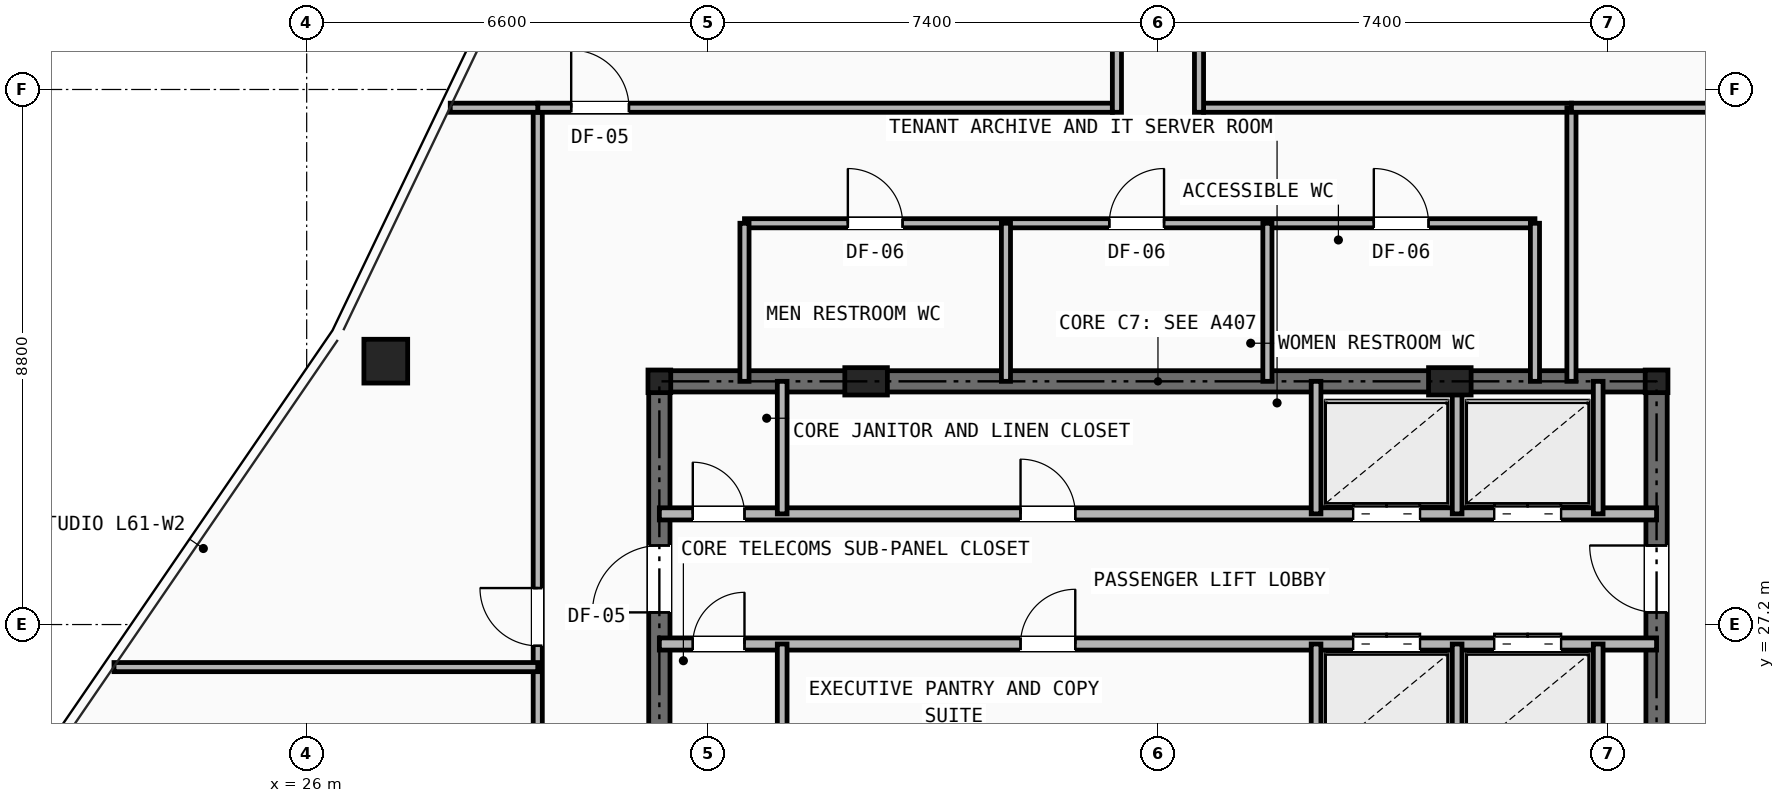
"""IFC4 building model, lengths in metres.
Left out: names, types, materials, properties, quantities, classifications, styles, units other than length and angle.
Written with IfcOpenShell. Run it as: python <this file> out.ifc"""

import sys

from ifc_helpers import new_model, si_unit, direction, frame, frame_2d, origin, origin_2d, place, context, subcontext, project, spatial, rectangle, hollow_rectangle, i_section, extrude, element, fill, save


model = new_model("IFC4")
c1 = context("Model", 3, precision=1e-05, world=origin(), true_north=direction((0.0, 1.0)))
c2 = subcontext(c1, "Body", "Model", "MODEL_VIEW")
j1 = project(units=[si_unit("LENGTHUNIT", "METRE"), si_unit("PLANEANGLEUNIT", "RADIAN")], contexts=[c1])
p1 = place(None, origin())
s1 = spatial("IfcSite", under=j1, at=p1, CompositionType="ELEMENT")
p2 = place(p1, origin())
s2 = spatial("IfcBuilding", under=s1, at=p2, CompositionType="ELEMENT")
p3 = place(p2, frame((0.0, 0.0, 215.4)))
s3 = spatial("IfcBuildingStorey", under=s2, at=p3, CompositionType="ELEMENT", Elevation=215.4)
for number, where, z_axis, x_axis in (
    (1, (31.8, 31.2, 0.0), (0.0, 0.0, 1.0), (1.0, 0.0, 0.0)),
    (2, (48.2, 31.2, 0.0), (0.0, 0.0, 1.0), (1.0, 0.0, 0.0)),
):
    element("IfcColumn", number, at=place(p3, frame(where, z_axis=z_axis, x_axis=x_axis)), inside=s3, PredefinedType="COLUMN", context=c2, shape_type="SweptSolid", body=[
        extrude(i_section(OverallWidth=0.374, OverallDepth=0.372, WebThickness=0.016, FlangeThickness=0.026, at=origin_2d()), origin(), (0.0, 0.0, 1.0), 3.5),
    ])
for number, where, z_axis, x_axis in (
    (3, (35.2, 31.2, 0.0), (0.0, 0.0, 1.0), (1.0, 0.0, 0.0)),
    (4, (44.8, 31.2, 0.0), (0.0, 0.0, 1.0), (1.0, 0.0, 0.0)),
):
    element("IfcColumn", number, at=place(p3, frame(where, z_axis=z_axis, x_axis=x_axis)), inside=s3, PredefinedType="PILASTER", context=c2, shape_type="SweptSolid", body=[
        extrude(rectangle(XDim=0.7, YDim=0.45, at=origin_2d()), origin(), (0.0, 0.0, 1.0), 3.5),
    ])
p4 = place(p3, frame((27.301, 31.532, 0.0), z_axis=(0.0, 0.0, 1.0), x_axis=(1.0, 0.0, 0.0)))
e5 = element("IfcColumn", 5, at=p4, inside=s3, PredefinedType="COLUMN", context=c2, shape_type="SweptSolid", body=[
    extrude(hollow_rectangle(XDim=0.72, YDim=0.72, WallThickness=0.05, at=origin_2d()), origin(), (0.0, 0.0, 1.0), 3.5),
])
p5 = place(p3, frame((31.8, 31.2, 0.0), z_axis=(0.0, 0.0, 1.0), x_axis=(1.0, 0.0, 0.0)))
e6 = element("IfcWall", 6, at=p5, inside=s3, PredefinedType="SHEAR", context=c2, shape_type="SweptSolid", body=[
    extrude(rectangle(XDim=16.4, YDim=0.35, at=frame_2d((8.2, 0.0))), origin(), (0.0, 0.0, 1.0), 3.25),
])
p6 = place(p3, frame((31.8, 16.4, 0.0), z_axis=(0.0, 0.0, 1.0), x_axis=(0.0, 1.0, 0.0)))
e7 = element("IfcWall", 7, at=p6, inside=s3, PredefinedType="SHEAR", context=c2, shape_type="SweptSolid", body=[
    extrude(rectangle(XDim=14.8, YDim=0.35, at=frame_2d((7.4, 0.0))), origin(), (0.0, 0.0, 1.0), 3.25),
])
p7 = place(p6, frame((11.0, 0.0, 0.0)))
e8 = element("IfcOpeningElement", 8, at=p7, cuts=e7, PredefinedType="OPENING", context=c2, shape_type="SweptSolid", body=[
    extrude(rectangle(XDim=1.1, YDim=2.15, at=frame_2d((0.55, 1.075))), frame((0.0, 0.185, 0.0), z_axis=(0.0, -1.0, 0.0), x_axis=(1.0, 0.0, 0.0)), (0.0, 0.0, 1.0), 0.37),
])
p8 = place(p3, frame((48.2, 16.4, 0.0), z_axis=(0.0, 0.0, 1.0), x_axis=(0.0, 1.0, 0.0)))
e9 = element("IfcWall", 9, at=p8, inside=s3, PredefinedType="SHEAR", context=c2, shape_type="SweptSolid", body=[
    extrude(rectangle(XDim=14.8, YDim=0.35, at=frame_2d((7.4, 0.0))), origin(), (0.0, 0.0, 1.0), 3.25),
])
p9 = place(p8, frame((11.0, 0.0, 0.0)))
e10 = element("IfcOpeningElement", 10, at=p9, cuts=e9, PredefinedType="OPENING", context=c2, shape_type="SweptSolid", body=[
    extrude(rectangle(XDim=1.1, YDim=2.15, at=frame_2d((0.55, 1.075))), frame((0.0, 0.185, 0.0), z_axis=(0.0, -1.0, 0.0), x_axis=(1.0, 0.0, 0.0)), (0.0, 0.0, 1.0), 0.37),
])
p10 = place(p3, frame((31.8, 29.02, 0.0), z_axis=(0.0, 0.0, 1.0), x_axis=(1.0, 0.0, 0.0)))
e11 = element("IfcWall", 11, at=p10, inside=s3, PredefinedType="SOLIDWALL", context=c2, shape_type="SweptSolid", body=[
    extrude(rectangle(XDim=16.4, YDim=0.2, at=frame_2d((8.2, 0.0))), origin(), (0.0, 0.0, 1.0), 2.705),
])
p11 = place(p10, frame((0.55, 0.0, 0.0)))
e12 = element("IfcOpeningElement", 12, at=p11, cuts=e11, PredefinedType="OPENING", context=c2, shape_type="SweptSolid", body=[
    extrude(rectangle(XDim=0.85, YDim=2.05, at=frame_2d((0.425, 1.025))), frame((0.0, 0.11, 0.0), z_axis=(0.0, -1.0, 0.0), x_axis=(1.0, 0.0, 0.0)), (0.0, 0.0, 1.0), 0.22),
])
p12 = place(p10, frame((5.94, 0.0, 0.0)))
e13 = element("IfcOpeningElement", 13, at=p12, cuts=e11, PredefinedType="OPENING", context=c2, shape_type="SweptSolid", body=[
    extrude(rectangle(XDim=0.9, YDim=2.1, at=frame_2d((0.45, 1.05))), frame((0.0, 0.11, 0.0), z_axis=(0.0, -1.0, 0.0), x_axis=(1.0, 0.0, 0.0)), (0.0, 0.0, 1.0), 0.22),
])
p13 = place(p10, frame((11.41, 0.0, 0.0)))
e14 = element("IfcOpeningElement", 14, at=p13, cuts=e11, PredefinedType="OPENING", context=c2, shape_type="SweptSolid", body=[
    extrude(rectangle(XDim=1.1, YDim=2.15, at=frame_2d((0.55, 1.075))), frame((0.0, 0.11, 0.0), z_axis=(0.0, -1.0, 0.0), x_axis=(1.0, 0.0, 0.0)), (0.0, 0.0, 1.0), 0.22),
])
p14 = place(p10, frame((13.73, 0.0, 0.0)))
e15 = element("IfcOpeningElement", 15, at=p14, cuts=e11, PredefinedType="OPENING", context=c2, shape_type="SweptSolid", body=[
    extrude(rectangle(XDim=1.1, YDim=2.15, at=frame_2d((0.55, 1.075))), frame((0.0, 0.11, 0.0), z_axis=(0.0, -1.0, 0.0), x_axis=(1.0, 0.0, 0.0)), (0.0, 0.0, 1.0), 0.22),
])
p15 = place(p3, frame((31.8, 26.88, 0.0), z_axis=(0.0, 0.0, 1.0), x_axis=(1.0, 0.0, 0.0)))
e16 = element("IfcWall", 16, at=p15, inside=s3, PredefinedType="SOLIDWALL", context=c2, shape_type="SweptSolid", body=[
    extrude(rectangle(XDim=16.4, YDim=0.2, at=frame_2d((8.2, 0.0))), origin(), (0.0, 0.0, 1.0), 2.705),
])
p16 = place(p15, frame((0.55, 0.0, 0.0)))
e17 = element("IfcOpeningElement", 17, at=p16, cuts=e16, PredefinedType="OPENING", context=c2, shape_type="SweptSolid", body=[
    extrude(rectangle(XDim=0.85, YDim=2.05, at=frame_2d((0.425, 1.025))), frame((0.0, 0.11, 0.0), z_axis=(0.0, -1.0, 0.0), x_axis=(1.0, 0.0, 0.0)), (0.0, 0.0, 1.0), 0.22),
])
p17 = place(p15, frame((5.94, 0.0, 0.0)))
e18 = element("IfcOpeningElement", 18, at=p17, cuts=e16, PredefinedType="OPENING", context=c2, shape_type="SweptSolid", body=[
    extrude(rectangle(XDim=0.9, YDim=2.1, at=frame_2d((0.45, 1.05))), frame((0.0, 0.11, 0.0), z_axis=(0.0, -1.0, 0.0), x_axis=(1.0, 0.0, 0.0)), (0.0, 0.0, 1.0), 0.22),
])
p18 = place(p15, frame((11.41, 0.0, 0.0)))
e19 = element("IfcOpeningElement", 19, at=p18, cuts=e16, PredefinedType="OPENING", context=c2, shape_type="SweptSolid", body=[
    extrude(rectangle(XDim=1.1, YDim=2.15, at=frame_2d((0.55, 1.075))), frame((0.0, 0.11, 0.0), z_axis=(0.0, -1.0, 0.0), x_axis=(1.0, 0.0, 0.0)), (0.0, 0.0, 1.0), 0.22),
])
p19 = place(p15, frame((13.73, 0.0, 0.0)))
e20 = element("IfcOpeningElement", 20, at=p19, cuts=e16, PredefinedType="OPENING", context=c2, shape_type="SweptSolid", body=[
    extrude(rectangle(XDim=1.1, YDim=2.15, at=frame_2d((0.55, 1.075))), frame((0.0, 0.11, 0.0), z_axis=(0.0, -1.0, 0.0), x_axis=(1.0, 0.0, 0.0)), (0.0, 0.0, 1.0), 0.22),
])
p20 = place(p3, frame((33.82, 29.02, 0.0), z_axis=(0.0, 0.0, 1.0), x_axis=(0.0, 1.0, 0.0)))
e21 = element("IfcWall", 21, at=p20, inside=s3, PredefinedType="SOLIDWALL", context=c2, shape_type="SweptSolid", body=[
    extrude(rectangle(XDim=2.18, YDim=0.16, at=frame_2d((1.09, 0.0))), origin(), (0.0, 0.0, 1.0), 2.705),
])
p21 = place(p3, frame((33.82, 24.8, 0.0), z_axis=(0.0, 0.0, 1.0), x_axis=(0.0, 1.0, 0.0)))
e22 = element("IfcWall", 22, at=p21, inside=s3, PredefinedType="SOLIDWALL", context=c2, shape_type="SweptSolid", body=[
    extrude(rectangle(XDim=2.08, YDim=0.16, at=frame_2d((1.04, 0.0))), origin(), (0.0, 0.0, 1.0), 3.25),
])
for number, where, z_axis, x_axis in (
    (23, (42.6, 29.02, 0.0), (0.0, 0.0, 1.0), (0.0, 1.0, 0.0)),
    (24, (44.92, 29.02, 0.0), (0.0, 0.0, 1.0), (0.0, 1.0, 0.0)),
    (25, (47.24, 29.02, 0.0), (0.0, 0.0, 1.0), (0.0, 1.0, 0.0)),
):
    element("IfcWall", number, at=place(p3, frame(where, z_axis=z_axis, x_axis=x_axis)), inside=s3, PredefinedType="SOLIDWALL", context=c2, shape_type="SweptSolid", body=[
        extrude(rectangle(XDim=2.18, YDim=0.16, at=frame_2d((1.09, 0.0))), origin(), (0.0, 0.0, 1.0), 2.705),
    ])
for number, where, z_axis, x_axis in (
    (26, (42.6, 24.8, 0.0), (0.0, 0.0, 1.0), (0.0, 1.0, 0.0)),
    (27, (44.92, 24.8, 0.0), (0.0, 0.0, 1.0), (0.0, 1.0, 0.0)),
    (28, (47.24, 24.8, 0.0), (0.0, 0.0, 1.0), (0.0, 1.0, 0.0)),
):
    element("IfcWall", number, at=place(p3, frame(where, z_axis=z_axis, x_axis=x_axis)), inside=s3, PredefinedType="SOLIDWALL", context=c2, shape_type="SweptSolid", body=[
        extrude(rectangle(XDim=2.08, YDim=0.16, at=frame_2d((1.04, 0.0))), origin(), (0.0, 0.0, 1.0), 3.25),
    ])
p22 = place(p3, frame((33.2, 33.8, 0.0), z_axis=(0.0, 0.0, 1.0), x_axis=(1.0, 0.0, 0.0)))
e29 = element("IfcWall", 29, at=p22, inside=s3, PredefinedType="PARTITIONING", context=c2, shape_type="SweptSolid", body=[
    extrude(rectangle(XDim=13.0, YDim=0.15, at=frame_2d((6.5, 0.0))), origin(), (0.0, 0.0, 1.0), 3.25),
])
p23 = place(p22, frame((1.7, 0.0, 0.0)))
e30 = element("IfcOpeningElement", 30, at=p23, cuts=e29, PredefinedType="OPENING", context=c2, shape_type="SweptSolid", body=[
    extrude(rectangle(XDim=0.9, YDim=2.1, at=frame_2d((0.45, 1.05))), frame((0.0, 0.085, 0.0), z_axis=(0.0, -1.0, 0.0), x_axis=(1.0, 0.0, 0.0)), (0.0, 0.0, 1.0), 0.17),
])
p24 = place(p22, frame((6.0, 0.0, 0.0)))
e31 = element("IfcOpeningElement", 31, at=p24, cuts=e29, PredefinedType="OPENING", context=c2, shape_type="SweptSolid", body=[
    extrude(rectangle(XDim=0.9, YDim=2.1, at=frame_2d((0.45, 1.05))), frame((0.0, 0.085, 0.0), z_axis=(0.0, -1.0, 0.0), x_axis=(1.0, 0.0, 0.0)), (0.0, 0.0, 1.0), 0.17),
])
p25 = place(p22, frame((10.35, 0.0, 0.0)))
e32 = element("IfcOpeningElement", 32, at=p25, cuts=e29, PredefinedType="OPENING", context=c2, shape_type="SweptSolid", body=[
    extrude(rectangle(XDim=0.9, YDim=2.1, at=frame_2d((0.45, 1.05))), frame((0.0, 0.085, 0.0), z_axis=(0.0, -1.0, 0.0), x_axis=(1.0, 0.0, 0.0)), (0.0, 0.0, 1.0), 0.17),
])
for number, where, z_axis, x_axis in (
    (33, (33.2, 31.2, 0.0), (0.0, 0.0, 1.0), (0.0, 1.0, 0.0)),
    (34, (46.2, 31.2, 0.0), (0.0, 0.0, 1.0), (0.0, 1.0, 0.0)),
    (35, (37.5, 31.2, 0.0), (0.0, 0.0, 1.0), (0.0, 1.0, 0.0)),
    (36, (41.8, 31.2, 0.0), (0.0, 0.0, 1.0), (0.0, 1.0, 0.0)),
):
    element("IfcWall", number, at=place(p3, frame(where, z_axis=z_axis, x_axis=x_axis)), inside=s3, PredefinedType="PARTITIONING", context=c2, shape_type="SweptSolid", body=[
        extrude(rectangle(XDim=2.6, YDim=0.15, at=frame_2d((1.3, 0.0))), origin(), (0.0, 0.0, 1.0), 2.705),
    ])
p26 = place(p3, frame((29.8, 16.4, 0.0), z_axis=(0.0, 0.0, 1.0), x_axis=(0.0, 1.0, 0.0)))
e37 = element("IfcWall", 37, at=p26, inside=s3, PredefinedType="PARTITIONING", context=c2, shape_type="SweptSolid", body=[
    extrude(rectangle(XDim=19.3, YDim=0.15, at=frame_2d((9.65, 0.0))), origin(), (0.0, 0.0, 1.0), 2.292),
])
p27 = place(p26, frame((0.35, 0.0, 0.0)))
e38 = element("IfcOpeningElement", 38, at=p27, cuts=e37, PredefinedType="OPENING", context=c2, shape_type="SweptSolid", body=[
    extrude(rectangle(XDim=0.95, YDim=2.1, at=frame_2d((0.475, 1.05))), frame((0.0, 0.085, 0.0), z_axis=(0.0, -1.0, 0.0), x_axis=(1.0, 0.0, 0.0)), (0.0, 0.0, 1.0), 0.17),
])
p28 = place(p26, frame((10.45, 0.0, 0.0)))
e39 = element("IfcOpeningElement", 39, at=p28, cuts=e37, PredefinedType="OPENING", context=c2, shape_type="SweptSolid", body=[
    extrude(rectangle(XDim=0.95, YDim=2.1, at=frame_2d((0.475, 1.05))), frame((0.0, 0.085, 0.0), z_axis=(0.0, -1.0, 0.0), x_axis=(1.0, 0.0, 0.0)), (0.0, 0.0, 1.0), 0.17),
])
p29 = place(p3, frame((29.8, 35.7, 0.0), z_axis=(0.0, 0.0, 1.0), x_axis=(1.0, 0.0, 0.0)))
e40 = element("IfcWall", 40, at=p29, inside=s3, PredefinedType="PARTITIONING", context=c2, shape_type="SweptSolid", body=[
    extrude(rectangle(XDim=9.45, YDim=0.15, at=frame_2d((4.725, 0.0))), origin(), (0.0, 0.0, 1.0), 2.833),
])
p30 = place(p29, frame((0.55, 0.0, 0.0)))
e41 = element("IfcOpeningElement", 41, at=p30, cuts=e40, PredefinedType="OPENING", context=c2, shape_type="SweptSolid", body=[
    extrude(rectangle(XDim=0.95, YDim=2.1, at=frame_2d((0.475, 1.05))), frame((0.0, 0.085, 0.0), z_axis=(0.0, -1.0, 0.0), x_axis=(1.0, 0.0, 0.0)), (0.0, 0.0, 1.0), 0.17),
])
p31 = place(p3, frame((40.75, 35.7, 0.0), z_axis=(0.0, 0.0, 1.0), x_axis=(1.0, 0.0, 0.0)))
e42 = element("IfcWall", 42, at=p31, inside=s3, PredefinedType="PARTITIONING", context=c2, shape_type="SweptSolid", body=[
    extrude(rectangle(XDim=6.05, YDim=0.15, at=frame_2d((3.025, 0.0))), origin(), (0.0, 0.0, 1.0), 3.25),
])
p32 = place(p3, frame((46.8, 31.2, 0.0), z_axis=(0.0, 0.0, 1.0), x_axis=(0.0, 1.0, 0.0)))
e43 = element("IfcWall", 43, at=p32, inside=s3, PredefinedType="PARTITIONING", context=c2, shape_type="SweptSolid", body=[
    extrude(rectangle(XDim=4.5, YDim=0.15, at=frame_2d((2.25, 0.0))), origin(), (0.0, 0.0, 1.0), 2.705),
])
p33 = place(p3, frame((28.361, 35.7, 0.0), z_axis=(0.0, 0.0, 1.0), x_axis=(1.0, 0.0, 0.0)))
e44 = element("IfcWall", 44, at=p33, inside=s3, PredefinedType="PARTITIONING", context=c2, shape_type="SweptSolid", body=[
    extrude(rectangle(XDim=1.439, YDim=0.15, at=frame_2d((0.719, 0.0))), origin(), (0.0, 0.0, 1.0), 2.628),
])
p34 = place(p3, frame((22.831, 26.5, 0.0), z_axis=(0.0, 0.0, 1.0), x_axis=(1.0, 0.0, 0.0)))
e45 = element("IfcWall", 45, at=p34, inside=s3, PredefinedType="PARTITIONING", context=c2, shape_type="SweptSolid", body=[
    extrude(rectangle(XDim=6.969, YDim=0.15, at=frame_2d((3.484, 0.0))), origin(), (0.0, 0.0, 1.0), 2.628),
])
p35 = place(p3, frame((46.8, 35.7, 0.0), z_axis=(0.0, 0.0, 1.0), x_axis=(1.0, 0.0, 0.0)))
e46 = element("IfcWall", 46, at=p35, inside=s3, PredefinedType="PARTITIONING", context=c2, shape_type="SweptSolid", body=[
    extrude(rectangle(XDim=4.839, YDim=0.15, at=frame_2d((2.419, 0.0))), origin(), (0.0, 0.0, 1.0), 2.628),
])
for number, where, z_axis, x_axis in (
    (47, (39.325, 35.625, 0.0), (0.0, 0.0, 1.0), (0.0, 1.0, 0.0)),
    (48, (40.675, 35.625, 0.0), (0.0, 0.0, 1.0), (0.0, 1.0, 0.0)),
):
    element("IfcWall", number, at=place(p3, frame(where, z_axis=z_axis, x_axis=x_axis)), inside=s3, PredefinedType="PARTITIONING", context=c2, shape_type="SweptSolid", body=[
        extrude(rectangle(XDim=2.825, YDim=0.15, at=frame_2d((1.413, 0.0))), origin(), (0.0, 0.0, 1.0), 3.25),
    ])
p36 = place(p11, origin())
e49 = element("IfcDoor", 49, at=p36, inside=s3, OperationType="SINGLE_SWING_LEFT", PredefinedType="DOOR", context=c2, shape_type="SweptSolid", body=[
    extrude(rectangle(XDim=0.85, YDim=2.05, at=frame_2d((0.425, 1.025))), frame((0.0, 0.025, 0.0), z_axis=(0.0, -1.0, 0.0), x_axis=(1.0, 0.0, 0.0)), (0.0, 0.0, 1.0), 0.05),
])
fill(e12, e49)
p37 = place(p16, origin())
e50 = element("IfcDoor", 50, at=p37, inside=s3, OperationType="SINGLE_SWING_RIGHT", PredefinedType="DOOR", context=c2, shape_type="SweptSolid", body=[
    extrude(rectangle(XDim=0.85, YDim=2.05, at=frame_2d((0.425, 1.025))), frame((0.0, 0.025, 0.0), z_axis=(0.0, -1.0, 0.0), x_axis=(1.0, 0.0, 0.0)), (0.0, 0.0, 1.0), 0.05),
])
fill(e17, e50)
p38 = place(p7, origin())
e51 = element("IfcDoor", 51, at=p38, inside=s3, OperationType="SINGLE_SWING_LEFT", PredefinedType="DOOR", context=c2, shape_type="SweptSolid", body=[
    extrude(rectangle(XDim=1.1, YDim=2.15, at=frame_2d((0.55, 1.075))), frame((0.0, 0.025, 0.0), z_axis=(0.0, -1.0, 0.0), x_axis=(1.0, 0.0, 0.0)), (0.0, 0.0, 1.0), 0.05),
])
fill(e8, e51)
p39 = place(p9, origin())
e52 = element("IfcDoor", 52, at=p39, inside=s3, OperationType="SINGLE_SWING_RIGHT", PredefinedType="DOOR", context=c2, shape_type="SweptSolid", body=[
    extrude(rectangle(XDim=1.1, YDim=2.15, at=frame_2d((0.55, 1.075))), frame((0.0, 0.025, 0.0), z_axis=(0.0, -1.0, 0.0), x_axis=(1.0, 0.0, 0.0)), (0.0, 0.0, 1.0), 0.05),
])
fill(e10, e52)
p40 = place(p12, origin())
e53 = element("IfcDoor", 53, at=p40, inside=s3, OperationType="SINGLE_SWING_LEFT", PredefinedType="DOOR", context=c2, shape_type="SweptSolid", body=[
    extrude(rectangle(XDim=0.9, YDim=2.1, at=frame_2d((0.45, 1.05))), frame((0.0, 0.025, 0.0), z_axis=(0.0, -1.0, 0.0), x_axis=(1.0, 0.0, 0.0)), (0.0, 0.0, 1.0), 0.05),
])
fill(e13, e53)
p41 = place(p17, origin())
e54 = element("IfcDoor", 54, at=p41, inside=s3, OperationType="SINGLE_SWING_RIGHT", PredefinedType="DOOR", context=c2, shape_type="SweptSolid", body=[
    extrude(rectangle(XDim=0.9, YDim=2.1, at=frame_2d((0.45, 1.05))), frame((0.0, 0.025, 0.0), z_axis=(0.0, -1.0, 0.0), x_axis=(1.0, 0.0, 0.0)), (0.0, 0.0, 1.0), 0.05),
])
fill(e18, e54)
p42 = place(p13, origin())
e55 = element("IfcDoor", 55, at=p42, inside=s3, OperationType="DOUBLE_DOOR_SLIDING", PredefinedType="DOOR", context=c2, shape_type="SweptSolid", body=[
    extrude(rectangle(XDim=1.1, YDim=2.15, at=frame_2d((0.55, 1.075))), frame((0.0, 0.025, 0.0), z_axis=(0.0, -1.0, 0.0), x_axis=(1.0, 0.0, 0.0)), (0.0, 0.0, 1.0), 0.05),
])
fill(e14, e55)
p43 = place(p14, origin())
e56 = element("IfcDoor", 56, at=p43, inside=s3, OperationType="DOUBLE_DOOR_SLIDING", PredefinedType="DOOR", context=c2, shape_type="SweptSolid", body=[
    extrude(rectangle(XDim=1.1, YDim=2.15, at=frame_2d((0.55, 1.075))), frame((0.0, 0.025, 0.0), z_axis=(0.0, -1.0, 0.0), x_axis=(1.0, 0.0, 0.0)), (0.0, 0.0, 1.0), 0.05),
])
fill(e15, e56)
p44 = place(p18, origin())
e57 = element("IfcDoor", 57, at=p44, inside=s3, OperationType="DOUBLE_DOOR_SLIDING", PredefinedType="DOOR", context=c2, shape_type="SweptSolid", body=[
    extrude(rectangle(XDim=1.1, YDim=2.15, at=frame_2d((0.55, 1.075))), frame((0.0, 0.025, 0.0), z_axis=(0.0, -1.0, 0.0), x_axis=(1.0, 0.0, 0.0)), (0.0, 0.0, 1.0), 0.05),
])
fill(e19, e57)
p45 = place(p19, origin())
e58 = element("IfcDoor", 58, at=p45, inside=s3, OperationType="DOUBLE_DOOR_SLIDING", PredefinedType="DOOR", context=c2, shape_type="SweptSolid", body=[
    extrude(rectangle(XDim=1.1, YDim=2.15, at=frame_2d((0.55, 1.075))), frame((0.0, 0.025, 0.0), z_axis=(0.0, -1.0, 0.0), x_axis=(1.0, 0.0, 0.0)), (0.0, 0.0, 1.0), 0.05),
])
fill(e20, e58)
p46 = place(p23, origin())
e59 = element("IfcDoor", 59, at=p46, inside=s3, OperationType="SINGLE_SWING_LEFT", PredefinedType="DOOR", context=c2, shape_type="SweptSolid", body=[
    extrude(rectangle(XDim=0.9, YDim=2.1, at=frame_2d((0.45, 1.05))), frame((0.0, 0.025, 0.0), z_axis=(0.0, -1.0, 0.0), x_axis=(1.0, 0.0, 0.0)), (0.0, 0.0, 1.0), 0.05),
])
fill(e30, e59)
p47 = place(p24, origin())
e60 = element("IfcDoor", 60, at=p47, inside=s3, OperationType="SINGLE_SWING_RIGHT", PredefinedType="DOOR", context=c2, shape_type="SweptSolid", body=[
    extrude(rectangle(XDim=0.9, YDim=2.1, at=frame_2d((0.45, 1.05))), frame((0.0, 0.025, 0.0), z_axis=(0.0, -1.0, 0.0), x_axis=(1.0, 0.0, 0.0)), (0.0, 0.0, 1.0), 0.05),
])
fill(e31, e60)
p48 = place(p25, origin())
e61 = element("IfcDoor", 61, at=p48, inside=s3, OperationType="SINGLE_SWING_LEFT", PredefinedType="DOOR", context=c2, shape_type="SweptSolid", body=[
    extrude(rectangle(XDim=0.9, YDim=2.1, at=frame_2d((0.45, 1.05))), frame((0.0, 0.025, 0.0), z_axis=(0.0, -1.0, 0.0), x_axis=(1.0, 0.0, 0.0)), (0.0, 0.0, 1.0), 0.05),
])
fill(e32, e61)
p49 = place(p28, origin())
e62 = element("IfcDoor", 62, at=p49, inside=s3, OperationType="SINGLE_SWING_RIGHT", PredefinedType="DOOR", context=c2, shape_type="SweptSolid", body=[
    extrude(rectangle(XDim=0.95, YDim=2.1, at=frame_2d((0.475, 1.05))), frame((0.0, 0.025, 0.0), z_axis=(0.0, -1.0, 0.0), x_axis=(1.0, 0.0, 0.0)), (0.0, 0.0, 1.0), 0.05),
])
fill(e39, e62)
p50 = place(p30, origin())
e63 = element("IfcDoor", 63, at=p50, inside=s3, OperationType="SINGLE_SWING_LEFT", PredefinedType="DOOR", context=c2, shape_type="SweptSolid", body=[
    extrude(rectangle(XDim=0.95, YDim=2.1, at=frame_2d((0.475, 1.05))), frame((0.0, 0.025, 0.0), z_axis=(0.0, -1.0, 0.0), x_axis=(1.0, 0.0, 0.0)), (0.0, 0.0, 1.0), 0.05),
])
fill(e41, e63)
save(model, sys.argv[1])
